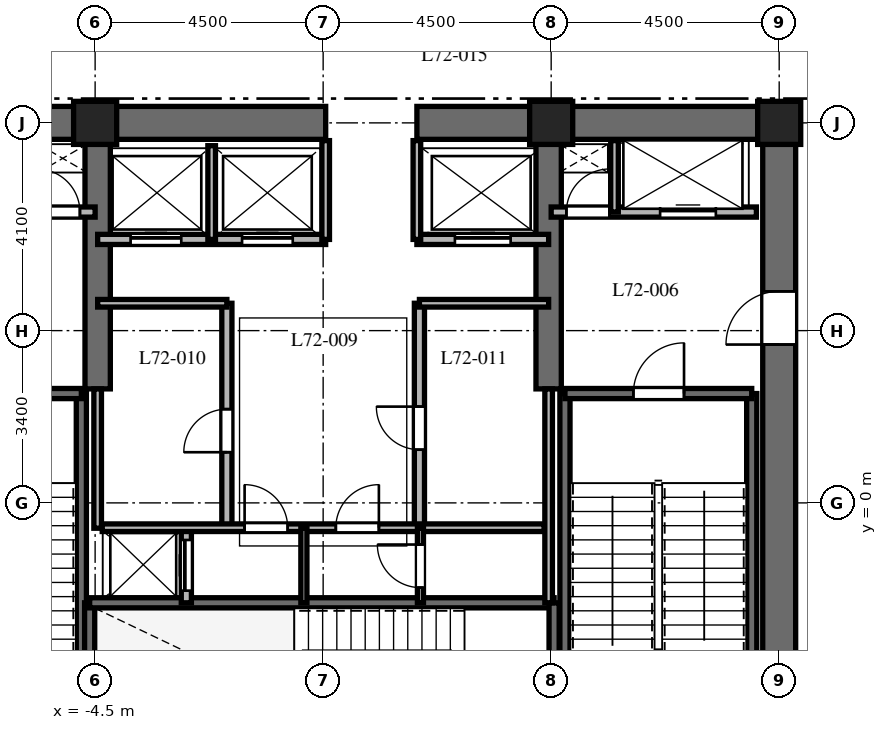
"""IFC4 building model, lengths in metres.
Left out: names, types, materials, properties, quantities, classifications, styles, units other than length and angle.
Written with IfcOpenShell. Run it as: python <this file> out.ifc"""

import sys

from ifc_helpers import new_model, si_unit, direction, frame, frame_2d, origin, origin_2d, place, context, subcontext, project, spatial, rectangle, extrude, element, fill, save


model = new_model("IFC4")
c1 = context("Model", 3, precision=1e-05, world=origin(), true_north=direction((0.0, 1.0)))
c2 = subcontext(c1, "Body", "Model", "MODEL_VIEW")
j1 = project(units=[si_unit("LENGTHUNIT", "METRE"), si_unit("PLANEANGLEUNIT", "RADIAN")], contexts=[c1])
p1 = place(None, origin())
s1 = spatial("IfcSite", under=j1, at=p1, CompositionType="ELEMENT")
p2 = place(p1, origin())
s2 = spatial("IfcBuilding", under=s1, at=p2, CompositionType="ELEMENT")
p3 = place(p2, frame((0.0, 0.0, 288.6)))
s3 = spatial("IfcBuildingStorey", under=s2, at=p3, CompositionType="ELEMENT", Elevation=288.6)
p4 = place(p3, frame((-9.325, 7.5, 0.0), z_axis=(0.0, 0.0, 1.0), x_axis=(1.0, 0.0, 0.0)))
e1 = element("IfcWall", 1, at=p4, inside=s3, PredefinedType="SHEAR", context=c2, shape_type="SweptSolid", body=[
    extrude(rectangle(XDim=9.375, YDim=0.65, at=frame_2d((4.688, 0.0))), origin(), (0.0, 0.0, 1.0), 4.5),
])
p5 = place(p3, frame((1.85, 7.5, 0.0), z_axis=(0.0, 0.0, 1.0), x_axis=(1.0, 0.0, 0.0)))
e2 = element("IfcWall", 2, at=p5, inside=s3, PredefinedType="SHEAR", context=c2, shape_type="SweptSolid", body=[
    extrude(rectangle(XDim=7.475, YDim=0.65, at=frame_2d((3.737, 0.0))), origin(), (0.0, 0.0, 1.0), 4.5),
])
p6 = place(p3, frame((9.0, -7.175, 0.0), z_axis=(0.0, 0.0, 1.0), x_axis=(0.0, 1.0, 0.0)))
e3 = element("IfcWall", 3, at=p6, inside=s3, PredefinedType="SHEAR", context=c2, shape_type="SweptSolid", body=[
    extrude(rectangle(XDim=14.35, YDim=0.65, at=frame_2d((7.175, 0.0))), origin(), (0.0, 0.0, 1.0), 4.5),
])
p7 = place(p6, frame((10.3, 0.0, 0.0)))
e4 = element("IfcOpeningElement", 4, at=p7, cuts=e3, PredefinedType="OPENING", context=c2, shape_type="SweptSolid", body=[
    extrude(rectangle(XDim=1.05, YDim=2.15, at=frame_2d((0.525, 1.075))), frame((0.0, 0.335, 0.0), z_axis=(0.0, -1.0, 0.0), x_axis=(1.0, 0.0, 0.0)), (0.0, 0.0, 1.0), 0.67),
])
for number, where, z_axis, x_axis in (
    (5, (-4.45, 2.25, 0.0), (0.0, 0.0, 1.0), (0.0, 1.0, 0.0)),
    (6, (4.45, 2.25, 0.0), (0.0, 0.0, 1.0), (0.0, 1.0, 0.0)),
):
    element("IfcWall", number, at=place(p3, frame(where, z_axis=z_axis, x_axis=x_axis)), inside=s3, PredefinedType="SHEAR", context=c2, shape_type="SweptSolid", body=[
        extrude(rectangle(XDim=4.925, YDim=0.5, at=frame_2d((2.462, 0.0))), origin(), (0.0, 0.0, 1.0), 4.5),
    ])
p8 = place(p3, frame((-4.772, -6.985, 0.0), z_axis=(0.0, 0.0, 1.0), x_axis=(0.0, 1.0, 0.0)))
e7 = element("IfcWall", 7, at=p8, inside=s3, PredefinedType="SHEAR", context=c2, shape_type="SweptSolid", body=[
    extrude(rectangle(XDim=9.143, YDim=0.2, at=frame_2d((4.572, 0.0))), origin(), (0.0, 0.0, 1.0), 4.5),
])
p9 = place(p3, frame((-8.458, 2.158, 0.0), z_axis=(0.0, 0.0, 1.0), x_axis=(1.0, 0.0, 0.0)))
e8 = element("IfcWall", 8, at=p9, inside=s3, PredefinedType="SHEAR", context=c2, shape_type="SweptSolid", body=[
    extrude(rectangle(XDim=3.686, YDim=0.2, at=frame_2d((1.843, 0.0))), origin(), (0.0, 0.0, 1.0), 4.5),
])
p10 = place(p9, frame((1.3, 0.0, 0.0)))
e9 = element("IfcOpeningElement", 9, at=p10, cuts=e8, PredefinedType="OPENING", context=c2, shape_type="SweptSolid", body=[
    extrude(rectangle(XDim=1.0, YDim=2.15, at=frame_2d((0.5, 1.075))), frame((0.0, 0.11, 0.0), z_axis=(0.0, -1.0, 0.0), x_axis=(1.0, 0.0, 0.0)), (0.0, 0.0, 1.0), 0.22),
])
for number, where, z_axis, x_axis in (
    (10, (4.772, -6.985, 0.0), (0.0, 0.0, 1.0), (0.0, 1.0, 0.0)),
    (11, (8.458, -6.985, 0.0), (0.0, 0.0, 1.0), (0.0, 1.0, 0.0)),
):
    element("IfcWall", number, at=place(p3, frame(where, z_axis=z_axis, x_axis=x_axis)), inside=s3, PredefinedType="SHEAR", context=c2, shape_type="SweptSolid", body=[
        extrude(rectangle(XDim=9.143, YDim=0.2, at=frame_2d((4.572, 0.0))), origin(), (0.0, 0.0, 1.0), 4.5),
    ])
p11 = place(p3, frame((4.772, 2.158, 0.0), z_axis=(0.0, 0.0, 1.0), x_axis=(1.0, 0.0, 0.0)))
e12 = element("IfcWall", 12, at=p11, inside=s3, PredefinedType="SHEAR", context=c2, shape_type="SweptSolid", body=[
    extrude(rectangle(XDim=3.686, YDim=0.2, at=frame_2d((1.843, 0.0))), origin(), (0.0, 0.0, 1.0), 4.5),
])
p12 = place(p11, frame((1.35, 0.0, 0.0)))
e13 = element("IfcOpeningElement", 13, at=p12, cuts=e12, PredefinedType="OPENING", context=c2, shape_type="SweptSolid", body=[
    extrude(rectangle(XDim=1.0, YDim=2.15, at=frame_2d((0.5, 1.075))), frame((0.0, 0.11, 0.0), z_axis=(0.0, -1.0, 0.0), x_axis=(1.0, 0.0, 0.0)), (0.0, 0.0, 1.0), 0.22),
])
p13 = place(p3, frame((-4.608, -5.658, 0.0), z_axis=(0.0, 0.0, 1.0), x_axis=(0.0, 1.0, 0.0)))
e14 = element("IfcWall", 14, at=p13, inside=s3, PredefinedType="SHEAR", context=c2, shape_type="SweptSolid", body=[
    extrude(rectangle(XDim=3.686, YDim=0.2, at=frame_2d((1.843, 0.0))), origin(), (0.0, 0.0, 1.0), 4.5),
])
p14 = place(p3, frame((-4.608, -1.972, 0.0), z_axis=(0.0, 0.0, 1.0), x_axis=(1.0, 0.0, 0.0)))
e15 = element("IfcWall", 15, at=p14, inside=s3, PredefinedType="SHEAR", context=c2, shape_type="SweptSolid", body=[
    extrude(rectangle(XDim=9.166, YDim=0.2, at=frame_2d((4.583, 0.0))), origin(), (0.0, 0.0, 1.0), 4.5),
])
p15 = place(p3, frame((4.558, -5.658, 0.0), z_axis=(0.0, 0.0, 1.0), x_axis=(0.0, 1.0, 0.0)))
e16 = element("IfcWall", 16, at=p15, inside=s3, PredefinedType="SHEAR", context=c2, shape_type="SweptSolid", body=[
    extrude(rectangle(XDim=3.686, YDim=0.2, at=frame_2d((1.843, 0.0))), origin(), (0.0, 0.0, 1.0), 4.5),
])
for number, where, z_axis, x_axis in (
    (17, (9.0, 7.5, 0.0), (0.0, 0.0, 1.0), (1.0, 0.0, 0.0)),
    (18, (4.5, 7.5, 0.0), (0.0, 0.0, 1.0), (1.0, 0.0, 0.0)),
    (19, (-4.5, 7.5, 0.0), (0.0, 0.0, 1.0), (1.0, 0.0, 0.0)),
):
    element("IfcColumn", number, at=place(p3, frame(where, z_axis=z_axis, x_axis=x_axis)), inside=s3, PredefinedType="COLUMN", context=c2, shape_type="SweptSolid", body=[
        extrude(rectangle(XDim=0.85, YDim=0.85, at=origin_2d()), origin(), (0.0, 0.0, 1.0), 4.5),
    ])
p16 = place(p3, frame((-8.55, 5.74, 0.0), z_axis=(0.0, 0.0, 1.0), x_axis=(1.0, 0.0, 0.0)))
e20 = element("IfcWall", 20, at=p16, inside=s3, PredefinedType="PARTITIONING", context=c2, shape_type="SweptSolid", body=[
    extrude(rectangle(XDim=4.05, YDim=0.2, at=frame_2d((2.025, 0.0))), origin(), (0.0, 0.0, 1.0), 4.18),
])
p17 = place(p16, frame((0.75, 0.0, 0.0)))
e21 = element("IfcOpeningElement", 21, at=p17, cuts=e20, PredefinedType="OPENING", context=c2, shape_type="SweptSolid", body=[
    extrude(rectangle(XDim=1.1, YDim=2.2, at=frame_2d((0.55, 1.1))), frame((0.0, 0.11, 0.0), z_axis=(0.0, -1.0, 0.0), x_axis=(1.0, 0.0, 0.0)), (0.0, 0.0, 1.0), 0.22),
])
p18 = place(p16, frame((2.9, 0.0, 0.0)))
e22 = element("IfcOpeningElement", 22, at=p18, cuts=e20, PredefinedType="OPENING", context=c2, shape_type="SweptSolid", body=[
    extrude(rectangle(XDim=0.85, YDim=2.03, at=frame_2d((0.425, 1.015))), frame((0.0, 0.11, 0.0), z_axis=(0.0, -1.0, 0.0), x_axis=(1.0, 0.0, 0.0)), (0.0, 0.0, 1.0), 0.22),
])
p19 = place(p3, frame((4.5, 5.74, 0.0), z_axis=(0.0, 0.0, 1.0), x_axis=(1.0, 0.0, 0.0)))
e23 = element("IfcWall", 23, at=p19, inside=s3, PredefinedType="PARTITIONING", context=c2, shape_type="SweptSolid", body=[
    extrude(rectangle(XDim=4.05, YDim=0.2, at=frame_2d((2.025, 0.0))), origin(), (0.0, 0.0, 1.0), 4.18),
])
p20 = place(p19, frame((0.3, 0.0, 0.0)))
e24 = element("IfcOpeningElement", 24, at=p20, cuts=e23, PredefinedType="OPENING", context=c2, shape_type="SweptSolid", body=[
    extrude(rectangle(XDim=0.85, YDim=2.03, at=frame_2d((0.425, 1.015))), frame((0.0, 0.11, 0.0), z_axis=(0.0, -1.0, 0.0), x_axis=(1.0, 0.0, 0.0)), (0.0, 0.0, 1.0), 0.22),
])
p21 = place(p19, frame((2.15, 0.0, 0.0)))
e25 = element("IfcOpeningElement", 25, at=p21, cuts=e23, PredefinedType="OPENING", context=c2, shape_type="SweptSolid", body=[
    extrude(rectangle(XDim=1.1, YDim=2.2, at=frame_2d((0.55, 1.1))), frame((0.0, 0.11, 0.0), z_axis=(0.0, -1.0, 0.0), x_axis=(1.0, 0.0, 0.0)), (0.0, 0.0, 1.0), 0.22),
])
p22 = place(p3, frame((5.75, 5.74, 0.0), z_axis=(0.0, 0.0, 1.0), x_axis=(0.0, 1.0, 0.0)))
e26 = element("IfcWall", 26, at=p22, inside=s3, PredefinedType="PARTITIONING", context=c2, shape_type="SweptSolid", body=[
    extrude(rectangle(XDim=1.41, YDim=0.15, at=frame_2d((0.705, 0.0))), origin(), (0.0, 0.0, 1.0), 4.18),
])
p23 = place(p3, frame((-2.7, -1.972, 0.0), z_axis=(0.0, 0.0, 1.0), x_axis=(0.0, 1.0, 0.0)))
e27 = element("IfcWall", 27, at=p23, inside=s3, PredefinedType="PARTITIONING", context=c2, shape_type="SweptSolid", body=[
    extrude(rectangle(XDim=1.472, YDim=0.2, at=frame_2d((0.736, 0.0))), origin(), (0.0, 0.0, 1.0), 4.18),
])
p24 = place(p23, frame((0.24, 0.0, 0.0)))
e28 = element("IfcOpeningElement", 28, at=p24, cuts=e27, PredefinedType="OPENING", context=c2, shape_type="SweptSolid", body=[
    extrude(rectangle(XDim=1.0, YDim=2.2, at=frame_2d((0.5, 1.1))), frame((0.0, 0.11, 0.0), z_axis=(0.0, -1.0, 0.0), x_axis=(1.0, 0.0, 0.0)), (0.0, 0.0, 1.0), 0.22),
])
p25 = place(p3, frame((-4.45, 5.2, 0.0), z_axis=(0.0, 0.0, 1.0), x_axis=(1.0, 0.0, 0.0)))
e29 = element("IfcWall", 29, at=p25, inside=s3, PredefinedType="PARTITIONING", context=c2, shape_type="SweptSolid", body=[
    extrude(rectangle(XDim=4.5, YDim=0.2, at=frame_2d((2.25, 0.0))), origin(), (0.0, 0.0, 1.0), 4.18),
])
p26 = place(p25, frame((0.65, 0.0, 0.0)))
e30 = element("IfcOpeningElement", 30, at=p26, cuts=e29, PredefinedType="OPENING", context=c2, shape_type="SweptSolid", body=[
    extrude(rectangle(XDim=1.0, YDim=2.2, at=frame_2d((0.5, 1.1))), frame((0.0, 0.11, 0.0), z_axis=(0.0, -1.0, 0.0), x_axis=(1.0, 0.0, 0.0)), (0.0, 0.0, 1.0), 0.22),
])
p27 = place(p25, frame((2.85, 0.0, 0.0)))
e31 = element("IfcOpeningElement", 31, at=p27, cuts=e29, PredefinedType="OPENING", context=c2, shape_type="SweptSolid", body=[
    extrude(rectangle(XDim=1.0, YDim=2.2, at=frame_2d((0.5, 1.1))), frame((0.0, 0.11, 0.0), z_axis=(0.0, -1.0, 0.0), x_axis=(1.0, 0.0, 0.0)), (0.0, 0.0, 1.0), 0.22),
])
p28 = place(p3, frame((1.85, 5.2, 0.0), z_axis=(0.0, 0.0, 1.0), x_axis=(1.0, 0.0, 0.0)))
e32 = element("IfcWall", 32, at=p28, inside=s3, PredefinedType="PARTITIONING", context=c2, shape_type="SweptSolid", body=[
    extrude(rectangle(XDim=2.6, YDim=0.2, at=frame_2d((1.3, 0.0))), origin(), (0.0, 0.0, 1.0), 4.18),
])
p29 = place(p28, frame((0.75, 0.0, 0.0)))
e33 = element("IfcOpeningElement", 33, at=p29, cuts=e32, PredefinedType="OPENING", context=c2, shape_type="SweptSolid", body=[
    extrude(rectangle(XDim=1.1, YDim=2.2, at=frame_2d((0.55, 1.1))), frame((0.0, 0.11, 0.0), z_axis=(0.0, -1.0, 0.0), x_axis=(1.0, 0.0, 0.0)), (0.0, 0.0, 1.0), 0.22),
])
p30 = place(p3, frame((-2.2, 5.2, 0.0), z_axis=(0.0, 0.0, 1.0), x_axis=(0.0, 1.0, 0.0)))
e34 = element("IfcWall", 34, at=p30, inside=s3, PredefinedType="PARTITIONING", context=c2, shape_type="SweptSolid", body=[
    extrude(rectangle(XDim=1.85, YDim=0.15, at=frame_2d((0.925, 0.0))), origin(), (0.0, 0.0, 1.0), 4.18),
])
for number, where, z_axis, x_axis in (
    (35, (0.05, 5.2, 0.0), (0.0, 0.0, 1.0), (0.0, 1.0, 0.0)),
    (36, (1.85, 5.2, 0.0), (0.0, 0.0, 1.0), (0.0, 1.0, 0.0)),
):
    element("IfcWall", number, at=place(p3, frame(where, z_axis=z_axis, x_axis=x_axis)), inside=s3, PredefinedType="PARTITIONING", context=c2, shape_type="SweptSolid", body=[
        extrude(rectangle(XDim=1.95, YDim=0.15, at=frame_2d((0.975, 0.0))), origin(), (0.0, 0.0, 1.0), 4.18),
    ])
p31 = place(p3, frame((-4.45, -0.5, 0.0), z_axis=(0.0, 0.0, 1.0), x_axis=(0.0, 1.0, 0.0)))
e37 = element("IfcWall", 37, at=p31, inside=s3, PredefinedType="PARTITIONING", context=c2, shape_type="SweptSolid", body=[
    extrude(rectangle(XDim=2.75, YDim=0.15, at=frame_2d((1.375, 0.0))), origin(), (0.0, 0.0, 1.0), 4.18),
])
p32 = place(p3, frame((4.45, -1.972, 0.0), z_axis=(0.0, 0.0, 1.0), x_axis=(0.0, 1.0, 0.0)))
e38 = element("IfcWall", 38, at=p32, inside=s3, PredefinedType="PARTITIONING", context=c2, shape_type="SweptSolid", body=[
    extrude(rectangle(XDim=4.222, YDim=0.15, at=frame_2d((2.111, 0.0))), origin(), (0.0, 0.0, 1.0), 4.18),
])
p33 = place(p3, frame((-1.9, -0.5, 0.0), z_axis=(0.0, 0.0, 1.0), x_axis=(0.0, 1.0, 0.0)))
e39 = element("IfcWall", 39, at=p33, inside=s3, PredefinedType="PARTITIONING", context=c2, shape_type="SweptSolid", body=[
    extrude(rectangle(XDim=4.44, YDim=0.2, at=frame_2d((2.22, 0.0))), origin(), (0.0, 0.0, 1.0), 4.18),
])
p34 = place(p33, frame((1.5, 0.0, 0.0)))
e40 = element("IfcOpeningElement", 40, at=p34, cuts=e39, PredefinedType="OPENING", context=c2, shape_type="SweptSolid", body=[
    extrude(rectangle(XDim=0.85, YDim=2.03, at=frame_2d((0.425, 1.015))), frame((0.0, 0.11, 0.0), z_axis=(0.0, -1.0, 0.0), x_axis=(1.0, 0.0, 0.0)), (0.0, 0.0, 1.0), 0.22),
])
p35 = place(p3, frame((-4.45, 3.94, 0.0), z_axis=(0.0, 0.0, 1.0), x_axis=(1.0, 0.0, 0.0)))
e41 = element("IfcWall", 41, at=p35, inside=s3, PredefinedType="PARTITIONING", context=c2, shape_type="SweptSolid", body=[
    extrude(rectangle(XDim=2.55, YDim=0.15, at=frame_2d((1.275, 0.0))), origin(), (0.0, 0.0, 1.0), 4.18),
])
p36 = place(p3, frame((1.9, -0.5, 0.0), z_axis=(0.0, 0.0, 1.0), x_axis=(0.0, 1.0, 0.0)))
e42 = element("IfcWall", 42, at=p36, inside=s3, PredefinedType="PARTITIONING", context=c2, shape_type="SweptSolid", body=[
    extrude(rectangle(XDim=4.44, YDim=0.2, at=frame_2d((2.22, 0.0))), origin(), (0.0, 0.0, 1.0), 4.18),
])
p37 = place(p36, frame((1.55, 0.0, 0.0)))
e43 = element("IfcOpeningElement", 43, at=p37, cuts=e42, PredefinedType="OPENING", context=c2, shape_type="SweptSolid", body=[
    extrude(rectangle(XDim=0.85, YDim=2.03, at=frame_2d((0.425, 1.015))), frame((0.0, 0.11, 0.0), z_axis=(0.0, -1.0, 0.0), x_axis=(1.0, 0.0, 0.0)), (0.0, 0.0, 1.0), 0.22),
])
p38 = place(p3, frame((1.9, 3.94, 0.0), z_axis=(0.0, 0.0, 1.0), x_axis=(1.0, 0.0, 0.0)))
e44 = element("IfcWall", 44, at=p38, inside=s3, PredefinedType="PARTITIONING", context=c2, shape_type="SweptSolid", body=[
    extrude(rectangle(XDim=2.55, YDim=0.15, at=frame_2d((1.275, 0.0))), origin(), (0.0, 0.0, 1.0), 4.18),
])
p39 = place(p3, frame((-4.36, -0.49, 0.0), z_axis=(0.0, 0.0, 1.0), x_axis=(1.0, 0.0, 0.0)))
e45 = element("IfcWall", 45, at=p39, inside=s3, PredefinedType="PARTITIONING", context=c2, shape_type="SweptSolid", body=[
    extrude(rectangle(XDim=8.72, YDim=0.15, at=frame_2d((4.36, 0.0))), origin(), (0.0, 0.0, 1.0), 4.18),
])
p40 = place(p39, frame((2.81, 0.0, 0.0)))
e46 = element("IfcOpeningElement", 46, at=p40, cuts=e45, PredefinedType="OPENING", context=c2, shape_type="SweptSolid", body=[
    extrude(rectangle(XDim=0.85, YDim=2.03, at=frame_2d((0.425, 1.015))), frame((0.0, 0.085, 0.0), z_axis=(0.0, -1.0, 0.0), x_axis=(1.0, 0.0, 0.0)), (0.0, 0.0, 1.0), 0.17),
])
p41 = place(p39, frame((4.61, 0.0, 0.0)))
e47 = element("IfcOpeningElement", 47, at=p41, cuts=e45, PredefinedType="OPENING", context=c2, shape_type="SweptSolid", body=[
    extrude(rectangle(XDim=0.85, YDim=2.03, at=frame_2d((0.425, 1.015))), frame((0.0, 0.085, 0.0), z_axis=(0.0, -1.0, 0.0), x_axis=(1.0, 0.0, 0.0)), (0.0, 0.0, 1.0), 0.17),
])
p42 = place(p3, frame((-0.38, -1.972, 0.0), z_axis=(0.0, 0.0, 1.0), x_axis=(0.0, 1.0, 0.0)))
e48 = element("IfcWall", 48, at=p42, inside=s3, PredefinedType="PARTITIONING", context=c2, shape_type="SweptSolid", body=[
    extrude(rectangle(XDim=1.472, YDim=0.12, at=frame_2d((0.736, 0.0))), origin(), (0.0, 0.0, 1.0), 4.18),
])
p43 = place(p3, frame((1.92, -1.972, 0.0), z_axis=(0.0, 0.0, 1.0), x_axis=(0.0, 1.0, 0.0)))
e49 = element("IfcWall", 49, at=p43, inside=s3, PredefinedType="PARTITIONING", context=c2, shape_type="SweptSolid", body=[
    extrude(rectangle(XDim=1.472, YDim=0.12, at=frame_2d((0.736, 0.0))), origin(), (0.0, 0.0, 1.0), 4.18),
])
p44 = place(p43, frame((0.3, 0.0, 0.0)))
e50 = element("IfcOpeningElement", 50, at=p44, cuts=e49, PredefinedType="OPENING", context=c2, shape_type="SweptSolid", body=[
    extrude(rectangle(XDim=0.85, YDim=2.03, at=frame_2d((0.425, 1.015))), frame((0.0, 0.07, 0.0), z_axis=(0.0, -1.0, 0.0), x_axis=(1.0, 0.0, 0.0)), (0.0, 0.0, 1.0), 0.14),
])
p45 = place(p12, origin())
e51 = element("IfcDoor", 51, at=p45, inside=s3, OperationType="SINGLE_SWING_RIGHT", PredefinedType="DOOR", context=c2, shape_type="SweptSolid", body=[
    extrude(rectangle(XDim=1.0, YDim=2.15, at=frame_2d((0.5, 1.075))), frame((0.0, 0.025, 0.0), z_axis=(0.0, -1.0, 0.0), x_axis=(1.0, 0.0, 0.0)), (0.0, 0.0, 1.0), 0.05),
])
fill(e13, e51)
p46 = place(p7, origin())
e52 = element("IfcDoor", 52, at=p46, inside=s3, OperationType="SINGLE_SWING_LEFT", PredefinedType="DOOR", context=c2, shape_type="SweptSolid", body=[
    extrude(rectangle(XDim=1.05, YDim=2.15, at=frame_2d((0.525, 1.075))), frame((0.0, 0.025, 0.0), z_axis=(0.0, -1.0, 0.0), x_axis=(1.0, 0.0, 0.0)), (0.0, 0.0, 1.0), 0.05),
])
fill(e4, e52)
p47 = place(p18, origin())
e53 = element("IfcDoor", 53, at=p47, inside=s3, OperationType="SINGLE_SWING_LEFT", PredefinedType="DOOR", context=c2, shape_type="SweptSolid", body=[
    extrude(rectangle(XDim=0.85, YDim=2.03, at=frame_2d((0.425, 1.015))), frame((0.0, 0.025, 0.0), z_axis=(0.0, -1.0, 0.0), x_axis=(1.0, 0.0, 0.0)), (0.0, 0.0, 1.0), 0.05),
])
fill(e22, e53)
p48 = place(p20, origin())
e54 = element("IfcDoor", 54, at=p48, inside=s3, OperationType="SINGLE_SWING_RIGHT", PredefinedType="DOOR", context=c2, shape_type="SweptSolid", body=[
    extrude(rectangle(XDim=0.85, YDim=2.03, at=frame_2d((0.425, 1.015))), frame((0.0, 0.025, 0.0), z_axis=(0.0, -1.0, 0.0), x_axis=(1.0, 0.0, 0.0)), (0.0, 0.0, 1.0), 0.05),
])
fill(e24, e54)
p49 = place(p21, origin())
e55 = element("IfcDoor", 55, at=p49, inside=s3, OperationType="SLIDING_TO_RIGHT", PredefinedType="DOOR", context=c2, shape_type="SweptSolid", body=[
    extrude(rectangle(XDim=1.1, YDim=2.2, at=frame_2d((0.55, 1.1))), frame((0.0, 0.025, 0.0), z_axis=(0.0, -1.0, 0.0), x_axis=(1.0, 0.0, 0.0)), (0.0, 0.0, 1.0), 0.05),
])
fill(e25, e55)
p50 = place(p24, origin())
e56 = element("IfcDoor", 56, at=p50, inside=s3, OperationType="SLIDING_TO_LEFT", PredefinedType="DOOR", context=c2, shape_type="SweptSolid", body=[
    extrude(rectangle(XDim=1.0, YDim=2.2, at=frame_2d((0.5, 1.1))), frame((0.0, 0.025, 0.0), z_axis=(0.0, -1.0, 0.0), x_axis=(1.0, 0.0, 0.0)), (0.0, 0.0, 1.0), 0.05),
])
fill(e28, e56)
p51 = place(p26, origin())
e57 = element("IfcDoor", 57, at=p51, inside=s3, OperationType="SLIDING_TO_LEFT", PredefinedType="DOOR", context=c2, shape_type="SweptSolid", body=[
    extrude(rectangle(XDim=1.0, YDim=2.2, at=frame_2d((0.5, 1.1))), frame((0.0, 0.025, 0.0), z_axis=(0.0, -1.0, 0.0), x_axis=(1.0, 0.0, 0.0)), (0.0, 0.0, 1.0), 0.05),
])
fill(e30, e57)
p52 = place(p27, origin())
e58 = element("IfcDoor", 58, at=p52, inside=s3, OperationType="SLIDING_TO_RIGHT", PredefinedType="DOOR", context=c2, shape_type="SweptSolid", body=[
    extrude(rectangle(XDim=1.0, YDim=2.2, at=frame_2d((0.5, 1.1))), frame((0.0, 0.025, 0.0), z_axis=(0.0, -1.0, 0.0), x_axis=(1.0, 0.0, 0.0)), (0.0, 0.0, 1.0), 0.05),
])
fill(e31, e58)
p53 = place(p29, origin())
e59 = element("IfcDoor", 59, at=p53, inside=s3, OperationType="SLIDING_TO_RIGHT", PredefinedType="DOOR", context=c2, shape_type="SweptSolid", body=[
    extrude(rectangle(XDim=1.1, YDim=2.2, at=frame_2d((0.55, 1.1))), frame((0.0, 0.025, 0.0), z_axis=(0.0, -1.0, 0.0), x_axis=(1.0, 0.0, 0.0)), (0.0, 0.0, 1.0), 0.05),
])
fill(e33, e59)
p54 = place(p34, origin())
e60 = element("IfcDoor", 60, at=p54, inside=s3, OperationType="SINGLE_SWING_LEFT", PredefinedType="DOOR", context=c2, shape_type="SweptSolid", body=[
    extrude(rectangle(XDim=0.85, YDim=2.03, at=frame_2d((0.425, 1.015))), frame((0.0, 0.025, 0.0), z_axis=(0.0, -1.0, 0.0), x_axis=(1.0, 0.0, 0.0)), (0.0, 0.0, 1.0), 0.05),
])
fill(e40, e60)
p55 = place(p37, origin())
e61 = element("IfcDoor", 61, at=p55, inside=s3, OperationType="SINGLE_SWING_RIGHT", PredefinedType="DOOR", context=c2, shape_type="SweptSolid", body=[
    extrude(rectangle(XDim=0.85, YDim=2.03, at=frame_2d((0.425, 1.015))), frame((0.0, 0.025, 0.0), z_axis=(0.0, -1.0, 0.0), x_axis=(1.0, 0.0, 0.0)), (0.0, 0.0, 1.0), 0.05),
])
fill(e43, e61)
p56 = place(p40, origin())
e62 = element("IfcDoor", 62, at=p56, inside=s3, OperationType="SINGLE_SWING_LEFT", PredefinedType="DOOR", context=c2, shape_type="SweptSolid", body=[
    extrude(rectangle(XDim=0.85, YDim=2.03, at=frame_2d((0.425, 1.015))), frame((0.0, 0.025, 0.0), z_axis=(0.0, -1.0, 0.0), x_axis=(1.0, 0.0, 0.0)), (0.0, 0.0, 1.0), 0.05),
])
fill(e46, e62)
p57 = place(p41, origin())
e63 = element("IfcDoor", 63, at=p57, inside=s3, OperationType="SINGLE_SWING_RIGHT", PredefinedType="DOOR", context=c2, shape_type="SweptSolid", body=[
    extrude(rectangle(XDim=0.85, YDim=2.03, at=frame_2d((0.425, 1.015))), frame((0.0, 0.025, 0.0), z_axis=(0.0, -1.0, 0.0), x_axis=(1.0, 0.0, 0.0)), (0.0, 0.0, 1.0), 0.05),
])
fill(e47, e63)
p58 = place(p44, origin())
e64 = element("IfcDoor", 64, at=p58, inside=s3, OperationType="SINGLE_SWING_RIGHT", PredefinedType="DOOR", context=c2, shape_type="SweptSolid", body=[
    extrude(rectangle(XDim=0.85, YDim=2.03, at=frame_2d((0.425, 1.015))), frame((0.0, 0.025, 0.0), z_axis=(0.0, -1.0, 0.0), x_axis=(1.0, 0.0, 0.0)), (0.0, 0.0, 1.0), 0.05),
])
fill(e50, e64)
save(model, sys.argv[1])
